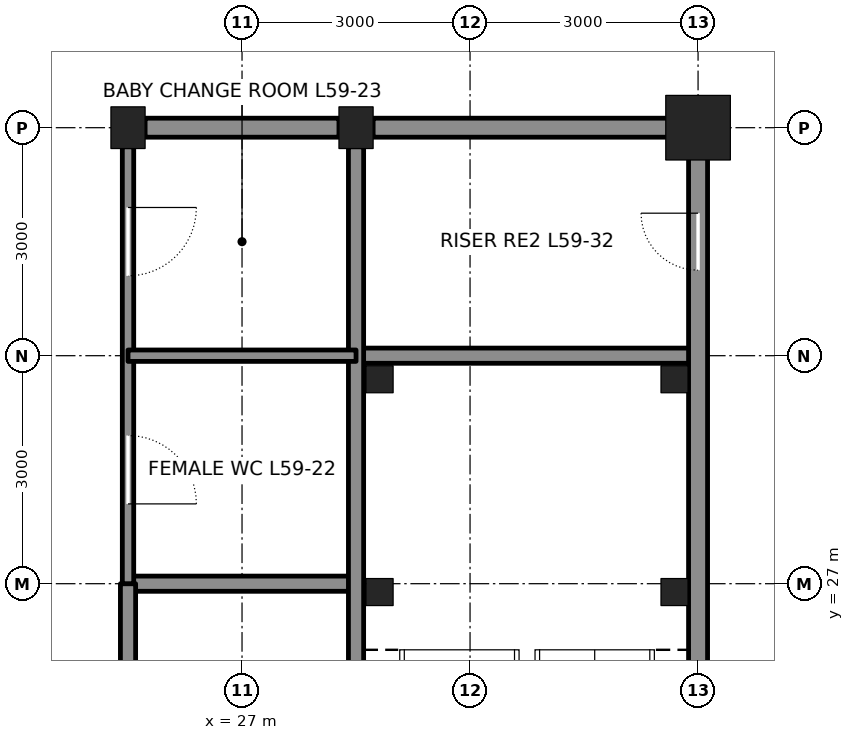
"""IFC4 building model, lengths in metres.
Left out: names, types, materials, properties, quantities, classifications, styles, units other than length and angle.
Written with IfcOpenShell. Run it as: python <this file> out.ifc"""

import sys

from ifc_helpers import new_model, si_unit, direction, frame, frame_2d, origin, origin_2d, place, context, subcontext, project, spatial, rectangle, hollow_rectangle, i_section, extrude, element, fill, save


model = new_model("IFC4")
c1 = context("Model", 3, precision=1e-05, world=origin(), true_north=direction((0.0, 1.0)))
c2 = subcontext(c1, "Body", "Model", "MODEL_VIEW")
j1 = project(units=[si_unit("LENGTHUNIT", "METRE"), si_unit("PLANEANGLEUNIT", "RADIAN")], contexts=[c1])
p1 = place(None, origin())
s1 = spatial("IfcSite", under=j1, at=p1, CompositionType="ELEMENT")
p2 = place(p1, origin())
s2 = spatial("IfcBuilding", under=s1, at=p2, CompositionType="ELEMENT")
p3 = place(p2, frame((0.0, 0.0, 266.4)))
s3 = spatial("IfcBuildingStorey", under=s2, at=p3, CompositionType="ELEMENT", Elevation=266.4)
for number, where, z_axis, x_axis in (
    (1, (25.5, 33.0, 0.0), (0.0, 0.0, 1.0), (1.0, 0.0, 0.0)),
    (2, (28.5, 33.0, 0.0), (0.0, 0.0, 1.0), (1.0, 0.0, 0.0)),
):
    element("IfcColumn", number, at=place(p3, frame(where, z_axis=z_axis, x_axis=x_axis)), inside=s3, PredefinedType="COLUMN", context=c2, shape_type="SweptSolid", body=[
        extrude(i_section(OverallWidth=0.449, OverallDepth=0.549, WebThickness=0.072, FlangeThickness=0.115, at=origin_2d()), origin(), (0.0, 0.0, 1.0), 4.2),
    ])
p4 = place(p3, frame((33.0, 33.0, 0.0), z_axis=(0.0, 0.0, 1.0), x_axis=(1.0, 0.0, 0.0)))
e3 = element("IfcColumn", 3, at=p4, inside=s3, PredefinedType="COLUMN", context=c2, shape_type="SweptSolid", body=[
    extrude(hollow_rectangle(XDim=0.85, YDim=0.85, WallThickness=0.085, at=origin_2d()), origin(), (0.0, 0.0, 1.0), 4.2),
])
p5 = place(p3, frame((25.5, 27.0, 0.0), z_axis=(0.0, 0.0, 1.0), x_axis=(1.0, 0.0, 0.0)))
e4 = element("IfcWall", 4, at=p5, inside=s3, PredefinedType="SOLIDWALL", context=c2, shape_type="SweptSolid", body=[
    extrude(rectangle(XDim=3.0, YDim=0.2, at=frame_2d((1.5, 0.0))), origin(), (0.0, 0.0, 1.0), 4.04),
])
p6 = place(p3, frame((28.5, 30.0, 0.0), z_axis=(0.0, 0.0, 1.0), x_axis=(1.0, 0.0, 0.0)))
e5 = element("IfcWall", 5, at=p6, inside=s3, PredefinedType="SOLIDWALL", context=c2, shape_type="SweptSolid", body=[
    extrude(rectangle(XDim=4.5, YDim=0.2, at=frame_2d((2.25, 0.0))), origin(), (0.0, 0.0, 1.0), 4.04),
])
p7 = place(p3, frame((25.725, 33.0, 0.0), z_axis=(0.0, 0.0, 1.0), x_axis=(1.0, 0.0, 0.0)))
e6 = element("IfcWall", 6, at=p7, inside=s3, PredefinedType="SOLIDWALL", context=c2, shape_type="SweptSolid", body=[
    extrude(rectangle(XDim=2.55, YDim=0.25, at=frame_2d((1.275, 0.0))), origin(), (0.0, 0.0, 1.0), 3.182),
])
p8 = place(p3, frame((28.725, 33.0, 0.0), z_axis=(0.0, 0.0, 1.0), x_axis=(1.0, 0.0, 0.0)))
e7 = element("IfcWall", 7, at=p8, inside=s3, PredefinedType="SOLIDWALL", context=c2, shape_type="SweptSolid", body=[
    extrude(rectangle(XDim=4.025, YDim=0.25, at=frame_2d((2.013, 0.0))), origin(), (0.0, 0.0, 1.0), 3.182),
])
p9 = place(p3, frame((25.5, 15.0, 0.0), z_axis=(0.0, 0.0, 1.0), x_axis=(0.0, 1.0, 0.0)))
e8 = element("IfcWall", 8, at=p9, inside=s3, PredefinedType="SOLIDWALL", context=c2, shape_type="SweptSolid", body=[
    extrude(rectangle(XDim=12.0, YDim=0.2, at=frame_2d((6.0, 0.0))), origin(), (0.0, 0.0, 1.0), 3.065),
])
p10 = place(p9, frame((2.55, 0.0, 0.0)))
e9 = element("IfcOpeningElement", 9, at=p10, cuts=e8, PredefinedType="OPENING", context=c2, shape_type="SweptSolid", body=[
    extrude(rectangle(XDim=0.9, YDim=2.1, at=frame_2d((0.45, 1.05))), frame((0.0, 0.11, 0.0), z_axis=(0.0, -1.0, 0.0), x_axis=(1.0, 0.0, 0.0)), (0.0, 0.0, 1.0), 0.22),
])
p11 = place(p3, frame((25.5, 27.0, 0.0), z_axis=(0.0, 0.0, 1.0), x_axis=(0.0, 1.0, 0.0)))
e10 = element("IfcWall", 10, at=p11, inside=s3, PredefinedType="PARTITIONING", context=c2, shape_type="SweptSolid", body=[
    extrude(rectangle(XDim=5.75, YDim=0.15, at=frame_2d((2.875, 0.0))), origin(), (0.0, 0.0, 1.0), 3.065),
])
p12 = place(p11, frame((1.05, 0.0, 0.0)))
e11 = element("IfcOpeningElement", 11, at=p12, cuts=e10, PredefinedType="OPENING", context=c2, shape_type="SweptSolid", body=[
    extrude(rectangle(XDim=0.9, YDim=2.1, at=frame_2d((0.45, 1.05))), frame((0.0, 0.085, 0.0), z_axis=(0.0, -1.0, 0.0), x_axis=(1.0, 0.0, 0.0)), (0.0, 0.0, 1.0), 0.17),
])
p13 = place(p11, frame((4.05, 0.0, 0.0)))
e12 = element("IfcOpeningElement", 12, at=p13, cuts=e10, PredefinedType="OPENING", context=c2, shape_type="SweptSolid", body=[
    extrude(rectangle(XDim=0.9, YDim=2.1, at=frame_2d((0.45, 1.05))), frame((0.0, 0.085, 0.0), z_axis=(0.0, -1.0, 0.0), x_axis=(1.0, 0.0, 0.0)), (0.0, 0.0, 1.0), 0.17),
])
p14 = place(p3, frame((28.5, 24.25, 0.0), z_axis=(0.0, 0.0, 1.0), x_axis=(0.0, 1.0, 0.0)))
e13 = element("IfcWall", 13, at=p14, inside=s3, PredefinedType="SOLIDWALL", context=c2, shape_type="SweptSolid", body=[
    extrude(rectangle(XDim=8.5, YDim=0.2, at=frame_2d((4.25, 0.0))), origin(), (0.0, 0.0, 1.0), 3.113),
])
p15 = place(p3, frame((33.0, 24.25, 0.0), z_axis=(0.0, 0.0, 1.0), x_axis=(0.0, 1.0, 0.0)))
e14 = element("IfcWall", 14, at=p15, inside=s3, PredefinedType="SOLIDWALL", context=c2, shape_type="SweptSolid", body=[
    extrude(rectangle(XDim=8.5, YDim=0.25, at=frame_2d((4.25, 0.0))), origin(), (0.0, 0.0, 1.0), 3.113),
])
p16 = place(p15, frame((6.875, 0.0, 0.0)))
e15 = element("IfcOpeningElement", 15, at=p16, cuts=e14, PredefinedType="OPENING", context=c2, shape_type="SweptSolid", body=[
    extrude(rectangle(XDim=0.75, YDim=2.1, at=frame_2d((0.375, 1.05))), frame((0.0, 0.135, 0.0), z_axis=(0.0, -1.0, 0.0), x_axis=(1.0, 0.0, 0.0)), (0.0, 0.0, 1.0), 0.27),
])
p17 = place(p3, frame((25.5, 30.0, 0.0), z_axis=(0.0, 0.0, 1.0), x_axis=(1.0, 0.0, 0.0)))
e16 = element("IfcWall", 16, at=p17, inside=s3, PredefinedType="PARTITIONING", context=c2, shape_type="SweptSolid", body=[
    extrude(rectangle(XDim=3.0, YDim=0.15, at=frame_2d((1.5, 0.0))), origin(), (0.0, 0.0, 1.0), 4.04),
])
for number, where, z_axis, x_axis in (
    (17, (28.81, 29.69, 0.0), (0.0, 0.0, 1.0), (1.0, 0.0, 0.0)),
    (18, (32.69, 29.69, 0.0), (0.0, 0.0, 1.0), (1.0, 0.0, 0.0)),
    (19, (28.81, 26.89, 0.0), (0.0, 0.0, 1.0), (1.0, 0.0, 0.0)),
    (20, (32.69, 26.89, 0.0), (0.0, 0.0, 1.0), (1.0, 0.0, 0.0)),
):
    element("IfcColumn", number, at=place(p3, frame(where, z_axis=z_axis, x_axis=x_axis)), inside=s3, PredefinedType="COLUMN", context=c2, shape_type="SweptSolid", body=[
        extrude(hollow_rectangle(XDim=0.356, YDim=0.356, WallThickness=0.009, at=origin_2d()), origin(), (0.0, 0.0, 1.0), 4.2),
    ])
p18 = place(p16, origin())
e21 = element("IfcDoor", 21, at=p18, inside=s3, OperationType="SINGLE_SWING_RIGHT", PredefinedType="DOOR", context=c2, shape_type="SweptSolid", body=[
    extrude(rectangle(XDim=0.75, YDim=2.1, at=frame_2d((0.375, 1.05))), frame((0.0, 0.025, 0.0), z_axis=(0.0, -1.0, 0.0), x_axis=(1.0, 0.0, 0.0)), (0.0, 0.0, 1.0), 0.05),
])
fill(e15, e21)
p19 = place(p12, frame((0.9, 0.0, 0.0), z_axis=(0.0, 0.0, 1.0), x_axis=(-1.0, 0.0, 0.0)))
e22 = element("IfcDoor", 22, at=p19, inside=s3, OperationType="SINGLE_SWING_RIGHT", PredefinedType="DOOR", context=c2, shape_type="SweptSolid", body=[
    extrude(rectangle(XDim=0.9, YDim=2.1, at=frame_2d((0.45, 1.05))), frame((0.0, 0.025, 0.0), z_axis=(0.0, -1.0, 0.0), x_axis=(1.0, 0.0, 0.0)), (0.0, 0.0, 1.0), 0.05),
])
fill(e11, e22)
p20 = place(p13, frame((0.9, 0.0, 0.0), z_axis=(0.0, 0.0, 1.0), x_axis=(-1.0, 0.0, 0.0)))
e23 = element("IfcDoor", 23, at=p20, inside=s3, OperationType="SINGLE_SWING_LEFT", PredefinedType="DOOR", context=c2, shape_type="SweptSolid", body=[
    extrude(rectangle(XDim=0.9, YDim=2.1, at=frame_2d((0.45, 1.05))), frame((0.0, 0.025, 0.0), z_axis=(0.0, -1.0, 0.0), x_axis=(1.0, 0.0, 0.0)), (0.0, 0.0, 1.0), 0.05),
])
fill(e12, e23)
save(model, sys.argv[1])
